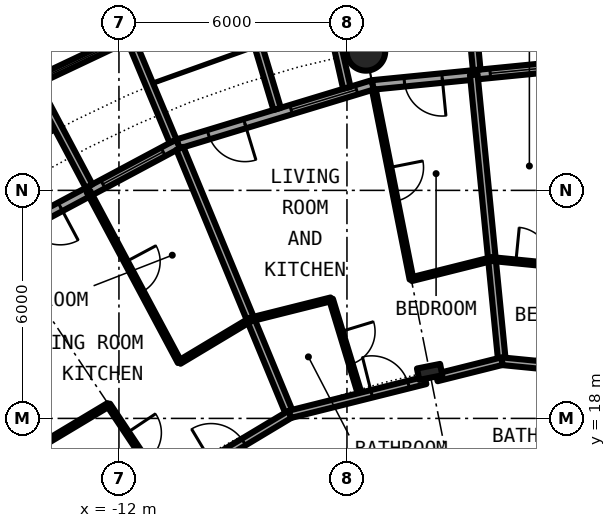
"""IFC4 building model, lengths in metres.
Left out: names, types, materials, properties, quantities, classifications, styles, units other than length and angle.
Written with IfcOpenShell. Run it as: python <this file> out.ifc"""

import sys

from ifc_helpers import new_model, si_unit, direction, frame, frame_2d, origin, origin_2d, place, context, subcontext, project, spatial, rectangle, circle, hollow_circle, i_section, extrude, element, fill, save


model = new_model("IFC4")
c1 = context("Model", 3, precision=1e-05, world=origin(), true_north=direction((0.0, 1.0)))
c2 = subcontext(c1, "Body", "Model", "MODEL_VIEW")
j1 = project(units=[si_unit("LENGTHUNIT", "METRE"), si_unit("PLANEANGLEUNIT", "RADIAN")], contexts=[c1])
p1 = place(None, origin())
s1 = spatial("IfcSite", under=j1, at=p1, CompositionType="ELEMENT")
p2 = place(p1, origin())
s2 = spatial("IfcBuilding", under=s1, at=p2, CompositionType="ELEMENT")
p3 = place(p2, frame((0.0, 0.0, 22.8)))
s3 = spatial("IfcBuildingStorey", under=s2, at=p3, CompositionType="ELEMENT", Elevation=22.8)
p4 = place(p3, frame((-5.501, 27.658, 0.0), z_axis=(0.0, 0.0, 1.0), x_axis=(1.0, 0.0, 0.0)))
e1 = element("IfcColumn", 1, at=p4, inside=s3, PredefinedType="COLUMN", context=c2, shape_type="SweptSolid", body=[
    extrude(hollow_circle(Radius=0.508, WallThickness=0.05, at=origin_2d()), origin(), (0.0, 0.0, 1.0), 3.05),
])
p5 = place(p3, frame((-3.824, 19.223, 0.0), z_axis=(0.0, 0.0, 1.0), x_axis=(-0.195090322016, 0.980785280403, 0.0)))
e2 = element("IfcColumn", 2, at=p5, inside=s3, PredefinedType="COLUMN", context=c2, shape_type="SweptSolid", body=[
    extrude(i_section(OverallWidth=0.305, OverallDepth=0.62, WebThickness=0.021, FlangeThickness=0.04, FilletRadius=0.027, at=origin_2d()), origin(), (0.0, 0.0, 1.0), 3.05),
])
p6 = place(p3, frame((0.0, 27.3, 0.0), z_axis=(0.0, 0.0, 1.0), x_axis=(-0.995173996315, -0.098126026407, 0.0)))
e3 = element("IfcWall", 3, at=p6, inside=s3, PredefinedType="SOLIDWALL", context=c2, shape_type="SweptSolid", body=[
    extrude(rectangle(XDim=5.352, YDim=0.25, at=frame_2d((2.676, 0.0))), origin(), (0.0, 0.0, 1.0), 2.7),
])
p7 = place(p6, frame((0.441, 0.0, 0.3)))
e4 = element("IfcOpeningElement", 4, at=p7, cuts=e3, PredefinedType="OPENING", context=c2, shape_type="SweptSolid", body=[
    extrude(rectangle(XDim=1.8, YDim=2.1, at=frame_2d((0.9, 1.05))), frame((0.0, 0.135, 0.0), z_axis=(0.0, -1.0, 0.0), x_axis=(1.0, 0.0, 0.0)), (0.0, 0.0, 1.0), 0.27),
])
p8 = place(p6, frame((3.51, 0.0, 0.0)))
e5 = element("IfcOpeningElement", 5, at=p8, cuts=e3, PredefinedType="OPENING", context=c2, shape_type="SweptSolid", body=[
    extrude(rectangle(XDim=1.0, YDim=2.2, at=frame_2d((0.5, 1.1))), frame((0.0, 0.135, 0.0), z_axis=(0.0, -1.0, 0.0), x_axis=(1.0, 0.0, 0.0)), (0.0, 0.0, 1.0), 0.27),
])
p9 = place(p3, frame((-2.586, 27.171, -0.03), z_axis=(0.0, 0.0, 1.0), x_axis=(-0.094548432284, 0.995520262954, 0.0)))
e6 = element("IfcWall", 6, at=p9, inside=s3, PredefinedType="SOLIDWALL", context=c2, shape_type="SweptSolid", body=[
    extrude(rectangle(XDim=3.006, YDim=0.2, at=frame_2d((1.503, 0.0))), origin(), (0.0, 0.0, 1.0), 2.73),
])
p10 = place(p3, frame((-5.326, 26.775, 0.0), z_axis=(0.0, 0.0, 1.0), x_axis=(-0.956965678721, -0.290201119486, 0.0)))
e7 = element("IfcWall", 7, at=p10, inside=s3, PredefinedType="SOLIDWALL", context=c2, shape_type="SweptSolid", body=[
    extrude(rectangle(XDim=5.351, YDim=0.25, at=frame_2d((2.676, 0.0))), origin(), (0.0, 0.0, 1.0), 2.7),
])
p11 = place(p10, frame((0.441, 0.0, 0.3)))
e8 = element("IfcOpeningElement", 8, at=p11, cuts=e7, PredefinedType="OPENING", context=c2, shape_type="SweptSolid", body=[
    extrude(rectangle(XDim=1.8, YDim=2.1, at=frame_2d((0.9, 1.05))), frame((0.0, 0.135, 0.0), z_axis=(0.0, -1.0, 0.0), x_axis=(1.0, 0.0, 0.0)), (0.0, 0.0, 1.0), 0.27),
])
p12 = place(p10, frame((3.51, 0.0, 0.0)))
e9 = element("IfcOpeningElement", 9, at=p12, cuts=e7, PredefinedType="OPENING", context=c2, shape_type="SweptSolid", body=[
    extrude(rectangle(XDim=1.0, YDim=2.2, at=frame_2d((0.5, 1.1))), frame((0.0, 0.135, 0.0), z_axis=(0.0, -1.0, 0.0), x_axis=(1.0, 0.0, 0.0)), (0.0, 0.0, 1.0), 0.27),
])
p13 = place(p3, frame((-6.004, 26.7, -0.03), z_axis=(0.0, 0.0, 1.0), x_axis=(-0.219609259383, 0.975587911566, 0.0)))
e10 = element("IfcWall", 10, at=p13, inside=s3, PredefinedType="SOLIDWALL", context=c2, shape_type="SweptSolid", body=[
    extrude(rectangle(XDim=2.933, YDim=0.2, at=frame_2d((1.466, 0.0))), origin(), (0.0, 0.0, 1.0), 2.73),
])
p14 = place(p3, frame((-7.837, 26.144, -0.03), z_axis=(0.0, 0.0, 1.0), x_axis=(-0.287064767992, 0.957911174889, 0.0)))
e11 = element("IfcWall", 11, at=p14, inside=s3, PredefinedType="SOLIDWALL", context=c2, shape_type="SweptSolid", body=[
    extrude(rectangle(XDim=3.006, YDim=0.2, at=frame_2d((1.503, 0.0))), origin(), (0.0, 0.0, 1.0), 2.73),
])
p15 = place(p3, frame((-10.447, 25.222, 0.0), z_axis=(0.0, 0.0, 1.0), x_axis=(-0.881915646801, -0.471407246368, 0.0)))
e12 = element("IfcWall", 12, at=p15, inside=s3, PredefinedType="SOLIDWALL", context=c2, shape_type="SweptSolid", body=[
    extrude(rectangle(XDim=5.352, YDim=0.25, at=frame_2d((2.676, 0.0))), origin(), (0.0, 0.0, 1.0), 2.7),
])
p16 = place(p15, frame((0.441, 0.0, 0.3)))
e13 = element("IfcOpeningElement", 13, at=p16, cuts=e12, PredefinedType="OPENING", context=c2, shape_type="SweptSolid", body=[
    extrude(rectangle(XDim=1.8, YDim=2.1, at=frame_2d((0.9, 1.05))), frame((0.0, 0.135, 0.0), z_axis=(0.0, -1.0, 0.0), x_axis=(1.0, 0.0, 0.0)), (0.0, 0.0, 1.0), 0.27),
])
p17 = place(p15, frame((3.51, 0.0, 0.0)))
e14 = element("IfcOpeningElement", 14, at=p17, cuts=e12, PredefinedType="OPENING", context=c2, shape_type="SweptSolid", body=[
    extrude(rectangle(XDim=1.0, YDim=2.2, at=frame_2d((0.5, 1.1))), frame((0.0, 0.135, 0.0), z_axis=(0.0, -1.0, 0.0), x_axis=(1.0, 0.0, 0.0)), (0.0, 0.0, 1.0), 0.27),
])
p18 = place(p3, frame((-11.629, 28.088, -0.03), z_axis=(0.0, 0.0, 1.0), x_axis=(-0.904000060331, -0.427532327342, 0.0)))
e15 = element("IfcWall", 15, at=p18, inside=s3, PredefinedType="SOLIDWALL", context=c2, shape_type="SweptSolid", body=[
    extrude(rectangle(XDim=2.993, YDim=0.2, at=frame_2d((1.497, 0.0))), origin(), (0.0, 0.0, 1.0), 2.73),
])
p19 = place(p18, frame((0.457, 0.0, 0.33)))
e16 = element("IfcOpeningElement", 16, at=p19, cuts=e15, PredefinedType="OPENING", context=c2, shape_type="SweptSolid", body=[
    extrude(circle(Radius=1.04, at=frame_2d((1.04, 1.04))), frame((0.0, 0.11, 0.0), z_axis=(0.0, -1.0, 0.0), x_axis=(1.0, 0.0, 0.0)), (0.0, 0.0, 1.0), 0.22),
])
p20 = place(p3, frame((-10.575, 25.295, -0.03), z_axis=(0.0, 0.0, 1.0), x_axis=(-0.385697364644, 0.922625353492, 0.0)))
e17 = element("IfcWall", 17, at=p20, inside=s3, PredefinedType="SOLIDWALL", context=c2, shape_type="SweptSolid", body=[
    extrude(rectangle(XDim=2.883, YDim=0.2, at=frame_2d((1.442, 0.0))), origin(), (0.0, 0.0, 1.0), 2.73),
])
p21 = place(p3, frame((-12.787, 24.113, -0.03), z_axis=(0.0, 0.0, 1.0), x_axis=(-0.468365282436, 0.883534924159, 0.0)))
e18 = element("IfcWall", 18, at=p21, inside=s3, PredefinedType="SOLIDWALL", context=c2, shape_type="SweptSolid", body=[
    extrude(rectangle(XDim=3.006, YDim=0.2, at=frame_2d((1.503, 0.0))), origin(), (0.0, 0.0, 1.0), 2.73),
])
p22 = place(p3, frame((-17.239, 21.008, 0.0), z_axis=(0.0, 0.0, 1.0), x_axis=(0.634318093068, -0.773072154981, 0.0)))
e19 = element("IfcWall", 19, at=p22, inside=s3, PredefinedType="PARTITIONING", context=c2, shape_type="SweptSolid", body=[
    extrude(rectangle(XDim=7.576, YDim=0.2, at=frame_2d((3.788, 0.0))), origin(), (0.0, 0.0, 1.0), 2.7),
])
p23 = place(p3, frame((-12.803, 23.97, 0.0), z_axis=(0.0, 0.0, 1.0), x_axis=(0.471170755767, -0.882042016522, 0.0)))
e20 = element("IfcWall", 20, at=p23, inside=s3, PredefinedType="PARTITIONING", context=c2, shape_type="SweptSolid", body=[
    extrude(rectangle(XDim=5.089, YDim=0.1, at=frame_2d((2.545, 0.0))), origin(), (0.0, 0.0, 1.0), 2.7),
])
p24 = place(p23, frame((2.095, 0.0, 0.0)))
e21 = element("IfcOpeningElement", 21, at=p24, cuts=e20, PredefinedType="OPENING", context=c2, shape_type="SweptSolid", body=[
    extrude(rectangle(XDim=0.9, YDim=2.3, at=frame_2d((0.45, 1.15))), frame((0.0, 0.06, 0.0), z_axis=(0.0, -1.0, 0.0), x_axis=(1.0, 0.0, 0.0)), (0.0, 0.0, 1.0), 0.12),
])
p25 = place(p3, frame((-12.276, 18.36, 0.0), z_axis=(0.0, 0.0, 1.0), x_axis=(0.55563200073, -0.831428337119, 0.0)))
e22 = element("IfcWall", 22, at=p25, inside=s3, PredefinedType="PARTITIONING", context=c2, shape_type="SweptSolid", body=[
    extrude(rectangle(XDim=2.176, YDim=0.1, at=frame_2d((1.088, 0.0))), origin(), (0.0, 0.0, 1.0), 2.7),
])
p26 = place(p25, frame((0.887, 0.0, 0.0)))
e23 = element("IfcOpeningElement", 23, at=p26, cuts=e22, PredefinedType="OPENING", context=c2, shape_type="SweptSolid", body=[
    extrude(rectangle(XDim=0.9, YDim=2.3, at=frame_2d((0.45, 1.15))), frame((0.0, 0.06, 0.0), z_axis=(0.0, -1.0, 0.0), x_axis=(1.0, 0.0, 0.0)), (0.0, 0.0, 1.0), 0.12),
])
p27 = place(p3, frame((-10.398, 25.106, 0.0), z_axis=(0.0, 0.0, 1.0), x_axis=(0.382490346157, -0.923959487801, 0.0)))
e24 = element("IfcWall", 24, at=p27, inside=s3, PredefinedType="PARTITIONING", context=c2, shape_type="SweptSolid", body=[
    extrude(rectangle(XDim=7.574, YDim=0.2, at=frame_2d((3.787, 0.0))), origin(), (0.0, 0.0, 1.0), 2.7),
])
p28 = place(p3, frame((-6.418, 21.133, 0.0), z_axis=(0.0, 0.0, 1.0), x_axis=(0.290478618436, -0.956881482855, 0.0)))
e25 = element("IfcWall", 25, at=p28, inside=s3, PredefinedType="PARTITIONING", context=c2, shape_type="SweptSolid", body=[
    extrude(rectangle(XDim=2.674, YDim=0.1, at=frame_2d((1.337, 0.0))), origin(), (0.0, 0.0, 1.0), 2.7),
])
p29 = place(p28, frame((0.887, 0.0, 0.0)))
e26 = element("IfcOpeningElement", 26, at=p29, cuts=e25, PredefinedType="OPENING", context=c2, shape_type="SweptSolid", body=[
    extrude(rectangle(XDim=0.9, YDim=2.3, at=frame_2d((0.45, 1.15))), frame((0.0, 0.06, 0.0), z_axis=(0.0, -1.0, 0.0), x_axis=(1.0, 0.0, 0.0)), (0.0, 0.0, 1.0), 0.12),
])
p30 = place(p3, frame((-5.293, 26.655, 0.0), z_axis=(0.0, 0.0, 1.0), x_axis=(0.194713709563, -0.980860118115, 0.0)))
e27 = element("IfcWall", 27, at=p30, inside=s3, PredefinedType="PARTITIONING", context=c2, shape_type="SweptSolid", body=[
    extrude(rectangle(XDim=5.089, YDim=0.1, at=frame_2d((2.545, 0.0))), origin(), (0.0, 0.0, 1.0), 2.7),
])
p31 = place(p30, frame((2.095, 0.0, 0.0)))
e28 = element("IfcOpeningElement", 28, at=p31, cuts=e27, PredefinedType="OPENING", context=c2, shape_type="SweptSolid", body=[
    extrude(rectangle(XDim=0.9, YDim=2.3, at=frame_2d((0.45, 1.15))), frame((0.0, 0.06, 0.0), z_axis=(0.0, -1.0, 0.0), x_axis=(1.0, 0.0, 0.0)), (0.0, 0.0, 1.0), 0.12),
])
p32 = place(p3, frame((-2.663, 27.044, 0.0), z_axis=(0.0, 0.0, 1.0), x_axis=(0.097987704654, -0.995187625394, 0.0)))
e29 = element("IfcWall", 29, at=p32, inside=s3, PredefinedType="PARTITIONING", context=c2, shape_type="SweptSolid", body=[
    extrude(rectangle(XDim=7.574, YDim=0.2, at=frame_2d((3.787, 0.0))), origin(), (0.0, 0.0, 1.0), 2.7),
])
p33 = place(p3, frame((-1.928, 19.505, 0.0), z_axis=(0.0, 0.0, 1.0), x_axis=(0.995204127684, -0.097819958296, 0.0)))
e30 = element("IfcWall", 30, at=p33, inside=s3, PredefinedType="PARTITIONING", context=c2, shape_type="SweptSolid", body=[
    extrude(rectangle(XDim=5.571, YDim=0.2, at=frame_2d((2.785, 0.0))), origin(), (0.0, 0.0, 1.0), 2.38),
])
p34 = place(p33, frame((2.375, 0.0, 0.0)))
e31 = element("IfcOpeningElement", 31, at=p34, cuts=e30, PredefinedType="OPENING", context=c2, shape_type="SweptSolid", body=[
    extrude(rectangle(XDim=1.0, YDim=2.3, at=frame_2d((0.5, 1.15))), frame((0.0, 0.11, 0.0), z_axis=(0.0, -1.0, 0.0), x_axis=(1.0, 0.0, 0.0)), (0.0, 0.0, 1.0), 0.22),
])
p35 = place(p3, frame((-10.653, 16.218, 0.0), z_axis=(0.0, 0.0, 1.0), x_axis=(0.857656999296, 0.514222200569, 0.0)))
e32 = element("IfcWall", 32, at=p35, inside=s3, PredefinedType="PARTITIONING", context=c2, shape_type="SweptSolid", body=[
    extrude(rectangle(XDim=3.675, YDim=0.2, at=frame_2d((1.838, 0.0))), origin(), (0.0, 0.0, 1.0), 2.38),
])
p36 = place(p35, frame((1.257, 0.0, 0.0)))
e33 = element("IfcOpeningElement", 33, at=p36, cuts=e32, PredefinedType="OPENING", context=c2, shape_type="SweptSolid", body=[
    extrude(rectangle(XDim=1.0, YDim=2.3, at=frame_2d((0.5, 1.15))), frame((0.0, 0.11, 0.0), z_axis=(0.0, -1.0, 0.0), x_axis=(1.0, 0.0, 0.0)), (0.0, 0.0, 1.0), 0.22),
])
p37 = place(p3, frame((-7.501, 18.108, 0.0), z_axis=(0.0, 0.0, 1.0), x_axis=(0.970040840928, 0.242941900323, 0.0)))
e34 = element("IfcWall", 34, at=p37, inside=s3, PredefinedType="PARTITIONING", context=c2, shape_type="SweptSolid", body=[
    extrude(rectangle(XDim=3.676, YDim=0.2, at=frame_2d((1.838, 0.0))), origin(), (0.0, 0.0, 1.0), 2.38),
])
p38 = place(p37, frame((2.217, 0.0, 0.0)))
e35 = element("IfcOpeningElement", 35, at=p38, cuts=e34, PredefinedType="OPENING", context=c2, shape_type="SweptSolid", body=[
    extrude(rectangle(XDim=1.0, YDim=2.3, at=frame_2d((0.5, 1.15))), frame((0.0, 0.11, 0.0), z_axis=(0.0, -1.0, 0.0), x_axis=(1.0, 0.0, 0.0)), (0.0, 0.0, 1.0), 0.22),
])
p39 = place(p3, frame((-3.639, 19.076, 0.0), z_axis=(0.0, 0.0, 1.0), x_axis=(0.970053237222, 0.242892397895, 0.0)))
e36 = element("IfcWall", 36, at=p39, inside=s3, PredefinedType="PARTITIONING", context=c2, shape_type="SweptSolid", body=[
    extrude(rectangle(XDim=1.771, YDim=0.2, at=frame_2d((0.885, 0.0))), origin(), (0.0, 0.0, 1.0), 2.38),
])
p40 = place(p3, frame((-2.191, 22.193, 0.0), z_axis=(0.0, 0.0, 1.0), x_axis=(0.995194459907, -0.097918266785, 0.0)))
e37 = element("IfcWall", 37, at=p40, inside=s3, PredefinedType="PARTITIONING", context=c2, shape_type="SweptSolid", body=[
    extrude(rectangle(XDim=4.361, YDim=0.1, at=frame_2d((2.18, 0.0))), origin(), (0.0, 0.0, 1.0), 2.7),
])
p41 = place(p40, frame((0.64, 0.0, 0.0)))
e38 = element("IfcOpeningElement", 38, at=p41, cuts=e37, PredefinedType="OPENING", context=c2, shape_type="SweptSolid", body=[
    extrude(rectangle(XDim=0.9, YDim=2.3, at=frame_2d((0.45, 1.15))), frame((0.0, 0.06, 0.0), z_axis=(0.0, -1.0, 0.0), x_axis=(1.0, 0.0, 0.0)), (0.0, 0.0, 1.0), 0.12),
])
for number, where, z_axis, x_axis in (
    (39, (-14.147, 17.237, 0.0), (0.0, 0.0, 1.0), (0.858, 0.514, 0.0)),
    (40, (-10.405, 19.481, 0.0), (0.0, 0.0, 1.0), (0.858, 0.514, 0.0)),
):
    element("IfcWall", number, at=place(p3, frame(where, z_axis=z_axis, x_axis=x_axis)), inside=s3, PredefinedType="PARTITIONING", context=c2, shape_type="SweptSolid", body=[
        extrude(rectangle(XDim=2.182, YDim=0.1, at=frame_2d((1.091, 0.0))), origin(), (0.0, 0.0, 1.0), 2.7),
    ])
p42 = place(p3, frame((-8.535, 20.603, 0.0), z_axis=(0.0, 0.0, 1.0), x_axis=(0.97003047456, 0.242983288366, 0.0)))
e41 = element("IfcWall", 41, at=p42, inside=s3, PredefinedType="PARTITIONING", context=c2, shape_type="SweptSolid", body=[
    extrude(rectangle(XDim=2.181, YDim=0.1, at=frame_2d((1.091, 0.0))), origin(), (0.0, 0.0, 1.0), 2.7),
])
p43 = place(p3, frame((-4.303, 21.663, 0.0), z_axis=(0.0, 0.0, 1.0), x_axis=(0.970056889313, 0.242877811867, 0.0)))
e42 = element("IfcWall", 42, at=p43, inside=s3, PredefinedType="PARTITIONING", context=c2, shape_type="SweptSolid", body=[
    extrude(rectangle(XDim=2.182, YDim=0.1, at=frame_2d((1.091, 0.0))), origin(), (0.0, 0.0, 1.0), 2.7),
])
p44 = place(p7, origin())
e43 = element("IfcWindow", 43, at=p44, inside=s3, PartitioningType="SINGLE_PANEL", PredefinedType="WINDOW", context=c2, shape_type="SweptSolid", body=[
    extrude(rectangle(XDim=1.8, YDim=2.1, at=frame_2d((0.9, 1.05))), frame((0.0, 0.03, 0.0), z_axis=(0.0, -1.0, 0.0), x_axis=(1.0, 0.0, 0.0)), (0.0, 0.0, 1.0), 0.06),
])
fill(e4, e43)
p45 = place(p8, origin())
e44 = element("IfcDoor", 44, at=p45, inside=s3, OperationType="SINGLE_SWING_LEFT", PredefinedType="DOOR", context=c2, shape_type="SweptSolid", body=[
    extrude(rectangle(XDim=1.0, YDim=2.2, at=frame_2d((0.5, 1.1))), frame((0.0, 0.025, 0.0), z_axis=(0.0, -1.0, 0.0), x_axis=(1.0, 0.0, 0.0)), (0.0, 0.0, 1.0), 0.05),
])
fill(e5, e44)
p46 = place(p11, origin())
e45 = element("IfcWindow", 45, at=p46, inside=s3, PartitioningType="SINGLE_PANEL", PredefinedType="WINDOW", context=c2, shape_type="SweptSolid", body=[
    extrude(rectangle(XDim=1.8, YDim=2.1, at=frame_2d((0.9, 1.05))), frame((0.0, 0.03, 0.0), z_axis=(0.0, -1.0, 0.0), x_axis=(1.0, 0.0, 0.0)), (0.0, 0.0, 1.0), 0.06),
])
fill(e8, e45)
p47 = place(p12, origin())
e46 = element("IfcDoor", 46, at=p47, inside=s3, OperationType="SINGLE_SWING_LEFT", PredefinedType="DOOR", context=c2, shape_type="SweptSolid", body=[
    extrude(rectangle(XDim=1.0, YDim=2.2, at=frame_2d((0.5, 1.1))), frame((0.0, 0.025, 0.0), z_axis=(0.0, -1.0, 0.0), x_axis=(1.0, 0.0, 0.0)), (0.0, 0.0, 1.0), 0.05),
])
fill(e9, e46)
p48 = place(p16, origin())
e47 = element("IfcWindow", 47, at=p48, inside=s3, PartitioningType="SINGLE_PANEL", PredefinedType="WINDOW", context=c2, shape_type="SweptSolid", body=[
    extrude(rectangle(XDim=1.8, YDim=2.1, at=frame_2d((0.9, 1.05))), frame((0.0, 0.03, 0.0), z_axis=(0.0, -1.0, 0.0), x_axis=(1.0, 0.0, 0.0)), (0.0, 0.0, 1.0), 0.06),
])
fill(e13, e47)
p49 = place(p19, origin())
e48 = element("IfcWindow", 48, at=p49, inside=s3, PartitioningType="SINGLE_PANEL", PredefinedType="WINDOW", context=c2, shape_type="SweptSolid", body=[
    extrude(circle(Radius=1.04, at=frame_2d((1.04, 1.04))), frame((0.0, 0.03, 0.0), z_axis=(0.0, -1.0, 0.0), x_axis=(1.0, 0.0, 0.0)), (0.0, 0.0, 1.0), 0.06),
])
fill(e16, e48)
p50 = place(p17, origin())
e49 = element("IfcDoor", 49, at=p50, inside=s3, OperationType="SINGLE_SWING_LEFT", PredefinedType="DOOR", context=c2, shape_type="SweptSolid", body=[
    extrude(rectangle(XDim=1.0, YDim=2.2, at=frame_2d((0.5, 1.1))), frame((0.0, 0.025, 0.0), z_axis=(0.0, -1.0, 0.0), x_axis=(1.0, 0.0, 0.0)), (0.0, 0.0, 1.0), 0.05),
])
fill(e14, e49)
p51 = place(p41, origin())
e50 = element("IfcDoor", 50, at=p51, inside=s3, OperationType="SINGLE_SWING_LEFT", PredefinedType="DOOR", context=c2, shape_type="SweptSolid", body=[
    extrude(rectangle(XDim=0.9, YDim=2.3, at=frame_2d((0.45, 1.15))), frame((0.0, 0.025, 0.0), z_axis=(0.0, -1.0, 0.0), x_axis=(1.0, 0.0, 0.0)), (0.0, 0.0, 1.0), 0.05),
])
fill(e38, e50)
p52 = place(p38, origin())
e51 = element("IfcDoor", 51, at=p52, inside=s3, OperationType="SINGLE_SWING_RIGHT", PredefinedType="DOOR", context=c2, shape_type="SweptSolid", body=[
    extrude(rectangle(XDim=1.0, YDim=2.3, at=frame_2d((0.5, 1.15))), frame((0.0, 0.025, 0.0), z_axis=(0.0, -1.0, 0.0), x_axis=(1.0, 0.0, 0.0)), (0.0, 0.0, 1.0), 0.05),
])
fill(e35, e51)
p53 = place(p29, origin())
e52 = element("IfcDoor", 52, at=p53, inside=s3, OperationType="SINGLE_SWING_RIGHT", PredefinedType="DOOR", context=c2, shape_type="SweptSolid", body=[
    extrude(rectangle(XDim=0.9, YDim=2.3, at=frame_2d((0.45, 1.15))), frame((0.0, 0.025, 0.0), z_axis=(0.0, -1.0, 0.0), x_axis=(1.0, 0.0, 0.0)), (0.0, 0.0, 1.0), 0.05),
])
fill(e26, e52)
p54 = place(p31, origin())
e53 = element("IfcDoor", 53, at=p54, inside=s3, OperationType="SINGLE_SWING_RIGHT", PredefinedType="DOOR", context=c2, shape_type="SweptSolid", body=[
    extrude(rectangle(XDim=0.9, YDim=2.3, at=frame_2d((0.45, 1.15))), frame((0.0, 0.025, 0.0), z_axis=(0.0, -1.0, 0.0), x_axis=(1.0, 0.0, 0.0)), (0.0, 0.0, 1.0), 0.05),
])
fill(e28, e53)
p55 = place(p36, origin())
e54 = element("IfcDoor", 54, at=p55, inside=s3, OperationType="SINGLE_SWING_LEFT", PredefinedType="DOOR", context=c2, shape_type="SweptSolid", body=[
    extrude(rectangle(XDim=1.0, YDim=2.3, at=frame_2d((0.5, 1.15))), frame((0.0, 0.025, 0.0), z_axis=(0.0, -1.0, 0.0), x_axis=(1.0, 0.0, 0.0)), (0.0, 0.0, 1.0), 0.05),
])
fill(e33, e54)
p56 = place(p26, origin())
e55 = element("IfcDoor", 55, at=p56, inside=s3, OperationType="SINGLE_SWING_RIGHT", PredefinedType="DOOR", context=c2, shape_type="SweptSolid", body=[
    extrude(rectangle(XDim=0.9, YDim=2.3, at=frame_2d((0.45, 1.15))), frame((0.0, 0.025, 0.0), z_axis=(0.0, -1.0, 0.0), x_axis=(1.0, 0.0, 0.0)), (0.0, 0.0, 1.0), 0.05),
])
fill(e23, e55)
p57 = place(p24, origin())
e56 = element("IfcDoor", 56, at=p57, inside=s3, OperationType="SINGLE_SWING_RIGHT", PredefinedType="DOOR", context=c2, shape_type="SweptSolid", body=[
    extrude(rectangle(XDim=0.9, YDim=2.3, at=frame_2d((0.45, 1.15))), frame((0.0, 0.025, 0.0), z_axis=(0.0, -1.0, 0.0), x_axis=(1.0, 0.0, 0.0)), (0.0, 0.0, 1.0), 0.05),
])
fill(e21, e56)
save(model, sys.argv[1])
